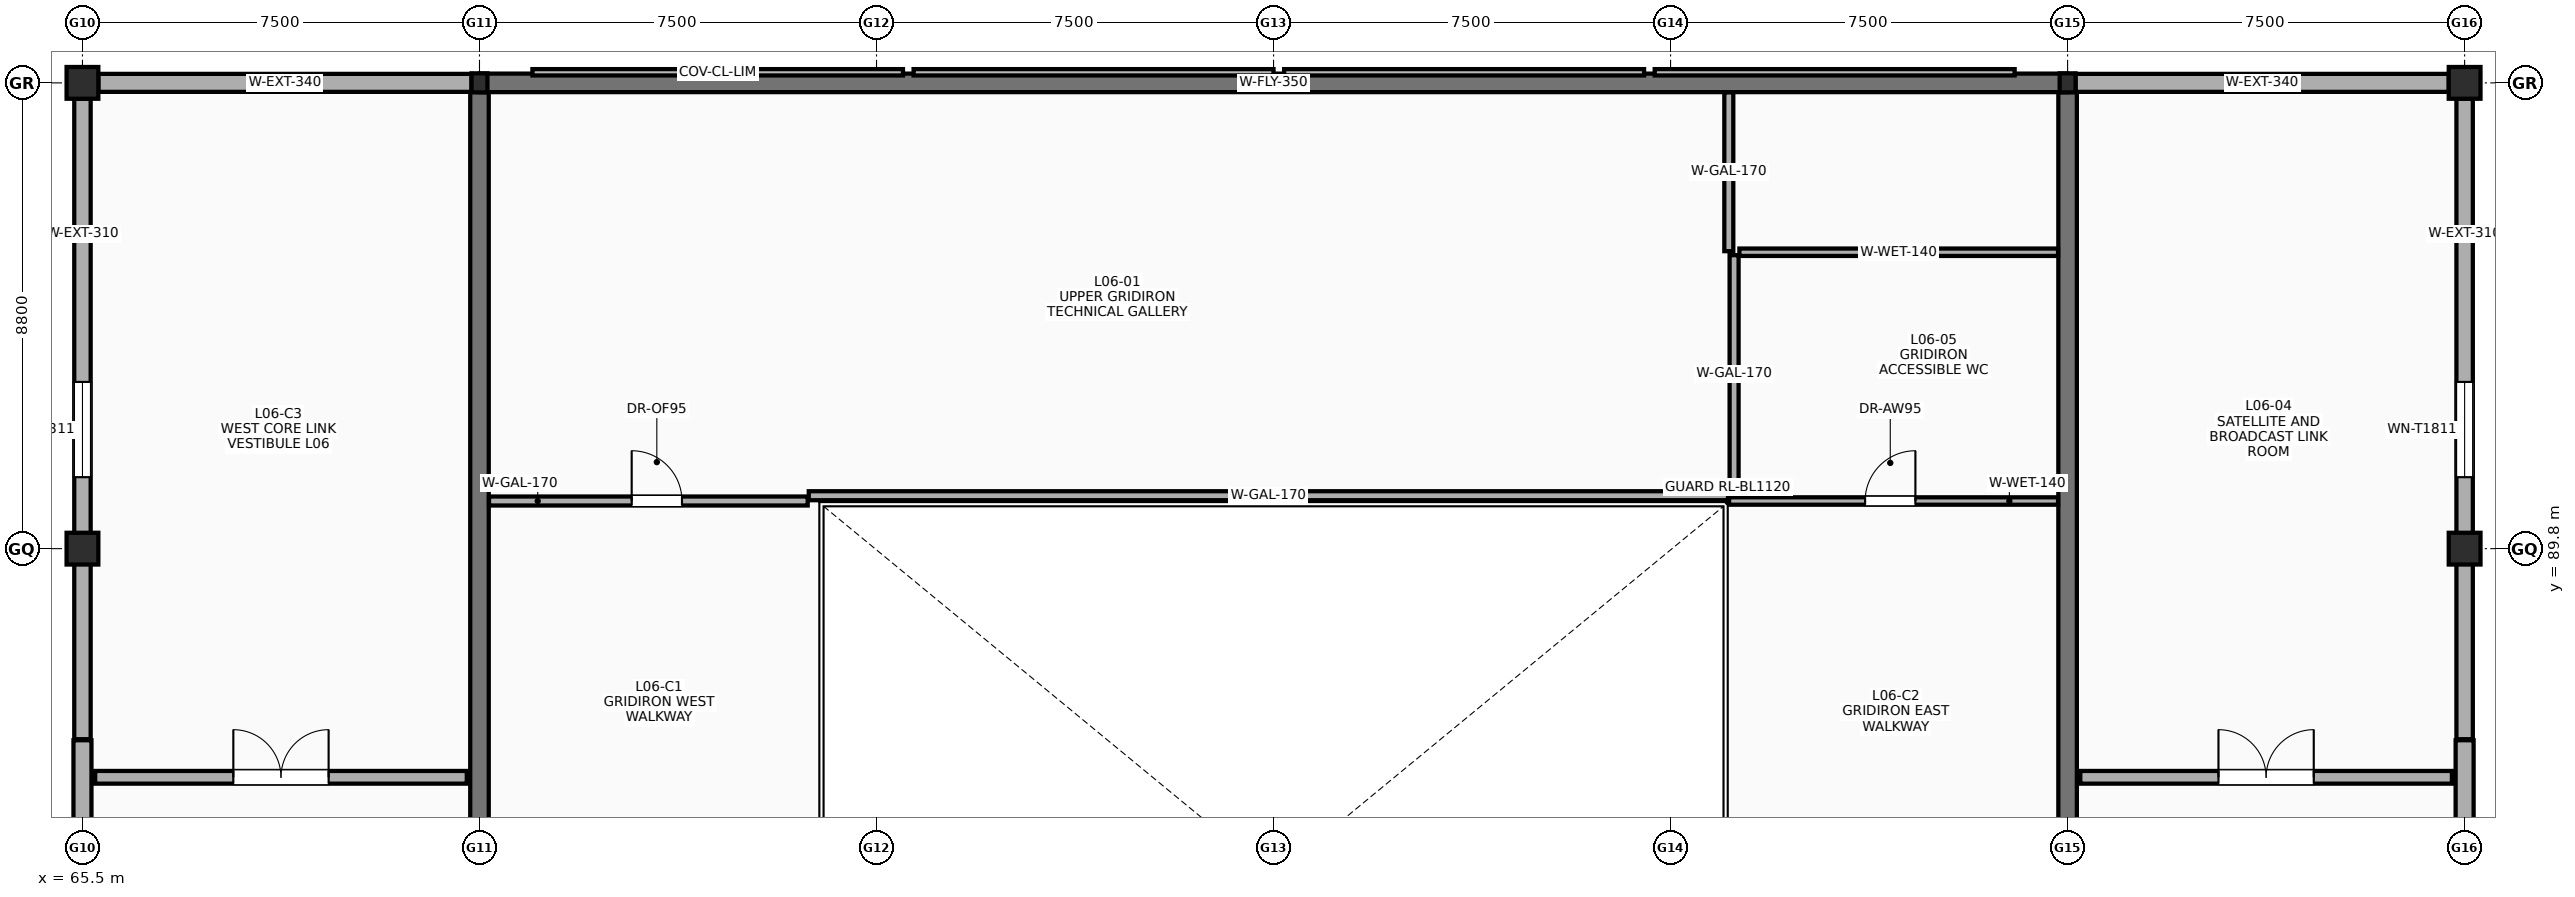
"""IFC4 building model, lengths in metres.
Left out: names, types, materials, properties, quantities, classifications, styles, units other than length and angle.
Written with IfcOpenShell. Run it as: python <this file> out.ifc"""

import sys

from ifc_helpers import new_model, si_unit, direction, frame, frame_2d, origin, origin_2d, place, context, subcontext, project, spatial, rectangle, i_section, extrude, element, fill, save


model = new_model("IFC4")
c1 = context("Model", 3, precision=1e-05, world=origin(), true_north=direction((0.0, 1.0)))
c2 = subcontext(c1, "Body", "Model", "MODEL_VIEW")
j1 = project(units=[si_unit("LENGTHUNIT", "METRE"), si_unit("PLANEANGLEUNIT", "RADIAN")], contexts=[c1])
p1 = place(None, origin())
s1 = spatial("IfcSite", under=j1, at=p1, CompositionType="ELEMENT")
p2 = place(p1, origin())
s2 = spatial("IfcBuilding", under=s1, at=p2, CompositionType="ELEMENT")
p3 = place(p2, frame((0.0, 0.0, 28.2)))
s3 = spatial("IfcBuildingStorey", under=s2, at=p3, CompositionType="ELEMENT", Elevation=28.2)
for number, where, z_axis, x_axis in (
    (1, (65.5, 89.8, 0.0), (0.0, 0.0, 1.0), (1.0, 0.0, 0.0)),
    (2, (65.5, 98.6, 0.0), (0.0, 0.0, 1.0), (1.0, 0.0, 0.0)),
):
    element("IfcColumn", number, at=place(p3, frame(where, z_axis=z_axis, x_axis=x_axis)), inside=s3, PredefinedType="COLUMN", context=c2, shape_type="SweptSolid", body=[
        extrude(rectangle(XDim=0.6, YDim=0.6, at=origin_2d()), origin(), (0.0, 0.0, 1.0), 2.8),
    ])
for number, where, z_axis, x_axis in (
    (3, (73.0, 98.6, 0.0), (0.0, 0.0, 1.0), (1.0, 0.0, 0.0)),
    (4, (103.0, 98.6, 0.0), (0.0, 0.0, 1.0), (1.0, 0.0, 0.0)),
):
    element("IfcColumn", number, at=place(p3, frame(where, z_axis=z_axis, x_axis=x_axis)), inside=s3, PredefinedType="COLUMN", context=c2, shape_type="SweptSolid", body=[
        extrude(i_section(OverallWidth=0.3, OverallDepth=0.36, WebThickness=0.012, FlangeThickness=0.022, FilletRadius=0.027, at=origin_2d()), origin(), (0.0, 0.0, 1.0), 2.8),
    ])
for number, where, z_axis, x_axis in (
    (5, (110.5, 89.8, 0.0), (0.0, 0.0, 1.0), (1.0, 0.0, 0.0)),
    (6, (110.5, 98.6, 0.0), (0.0, 0.0, 1.0), (1.0, 0.0, 0.0)),
):
    element("IfcColumn", number, at=place(p3, frame(where, z_axis=z_axis, x_axis=x_axis)), inside=s3, PredefinedType="COLUMN", context=c2, shape_type="SweptSolid", body=[
        extrude(rectangle(XDim=0.6, YDim=0.6, at=origin_2d()), origin(), (0.0, 0.0, 1.0), 2.8),
    ])
p4 = place(p3, frame((73.0, 72.77, 0.0), z_axis=(0.0, 0.0, 1.0), x_axis=(0.0, 1.0, 0.0)))
e7 = element("IfcWall", 7, at=p4, inside=s3, PredefinedType="SHEAR", context=c2, shape_type="SweptSolid", body=[
    extrude(rectangle(XDim=25.66, YDim=0.35, at=frame_2d((12.83, 0.0))), origin(), (0.0, 0.0, 1.0), 2.8),
])
p5 = place(p4, frame((11.33, 0.0, 0.0), z_axis=(0.0, 0.0, 1.0), x_axis=(-1.0, 0.0, 0.0)))
e8 = element("IfcOpeningElement", 8, at=p5, cuts=e7, PredefinedType="OPENING", context=c2, shape_type="SweptSolid", body=[
    extrude(rectangle(XDim=1.2, YDim=2.15, at=frame_2d((0.6, 1.075))), frame((0.0, 0.185, 0.0), z_axis=(0.0, -1.0, 0.0), x_axis=(1.0, 0.0, 0.0)), (0.0, 0.0, 1.0), 0.37),
])
p6 = place(p3, frame((103.0, 72.77, 0.0), z_axis=(0.0, 0.0, 1.0), x_axis=(0.0, 1.0, 0.0)))
e9 = element("IfcWall", 9, at=p6, inside=s3, PredefinedType="SHEAR", context=c2, shape_type="SweptSolid", body=[
    extrude(rectangle(XDim=25.66, YDim=0.35, at=frame_2d((12.83, 0.0))), origin(), (0.0, 0.0, 1.0), 2.8),
])
p7 = place(p6, frame((10.13, 0.0, 0.0)))
e10 = element("IfcOpeningElement", 10, at=p7, cuts=e9, PredefinedType="OPENING", context=c2, shape_type="SweptSolid", body=[
    extrude(rectangle(XDim=1.2, YDim=2.15, at=frame_2d((0.6, 1.075))), frame((0.0, 0.185, 0.0), z_axis=(0.0, -1.0, 0.0), x_axis=(1.0, 0.0, 0.0)), (0.0, 0.0, 1.0), 0.37),
])
p8 = place(p3, frame((73.005, 98.6, 0.0), z_axis=(0.0, 0.0, 1.0), x_axis=(1.0, 0.0, 0.0)))
e11 = element("IfcWall", 11, at=p8, inside=s3, PredefinedType="SHEAR", context=c2, shape_type="SweptSolid", body=[
    extrude(rectangle(XDim=29.99, YDim=0.35, at=frame_2d((14.995, 0.0))), origin(), (0.0, 0.0, 1.0), 2.8),
])
p9 = place(p3, frame((65.5, 86.2, 0.0), z_axis=(0.0, 0.0, 1.0), x_axis=(0.0, 1.0, 0.0)))
e12 = element("IfcWall", 12, at=p9, inside=s3, PredefinedType="SOLIDWALL", context=c2, shape_type="SweptSolid", body=[
    extrude(rectangle(XDim=12.1, YDim=0.31, at=frame_2d((6.05, 0.0))), origin(), (0.0, 0.0, 1.0), 1.76),
])
p10 = place(p9, frame((4.95, 0.0, 0.48)))
e13 = element("IfcOpeningElement", 13, at=p10, cuts=e12, PredefinedType="OPENING", context=c2, shape_type="SweptSolid", body=[
    extrude(rectangle(XDim=1.8, YDim=1.1, at=frame_2d((0.9, 0.55))), frame((0.0, 0.165, 0.0), z_axis=(0.0, -1.0, 0.0), x_axis=(1.0, 0.0, 0.0)), (0.0, 0.0, 1.0), 0.33),
])
p11 = place(p3, frame((110.5, 86.2, 0.0), z_axis=(0.0, 0.0, 1.0), x_axis=(0.0, 1.0, 0.0)))
e14 = element("IfcWall", 14, at=p11, inside=s3, PredefinedType="SOLIDWALL", context=c2, shape_type="SweptSolid", body=[
    extrude(rectangle(XDim=12.1, YDim=0.31, at=frame_2d((6.05, 0.0))), origin(), (0.0, 0.0, 1.0), 1.76),
])
p12 = place(p11, frame((4.95, 0.0, 0.48)))
e15 = element("IfcOpeningElement", 15, at=p12, cuts=e14, PredefinedType="OPENING", context=c2, shape_type="SweptSolid", body=[
    extrude(rectangle(XDim=1.8, YDim=1.1, at=frame_2d((0.9, 0.55))), frame((0.0, 0.165, 0.0), z_axis=(0.0, -1.0, 0.0), x_axis=(1.0, 0.0, 0.0)), (0.0, 0.0, 1.0), 0.33),
])
for number, where, z_axis, x_axis in (
    (16, (65.8, 98.6, 0.0), (0.0, 0.0, 1.0), (1.0, 0.0, 0.0)),
    (17, (103.15, 98.6, 0.0), (0.0, 0.0, 1.0), (1.0, 0.0, 0.0)),
):
    element("IfcWall", number, at=place(p3, frame(where, z_axis=z_axis, x_axis=x_axis)), inside=s3, PredefinedType="SOLIDWALL", context=c2, shape_type="SweptSolid", body=[
        extrude(rectangle(XDim=7.05, YDim=0.34, at=frame_2d((3.525, 0.0))), origin(), (0.0, 0.0, 1.0), 1.76),
    ])
p13 = place(p3, frame((65.74, 85.48, 0.0), z_axis=(0.0, 0.0, 1.0), x_axis=(1.0, 0.0, 0.0)))
e18 = element("IfcWall", 18, at=p13, inside=s3, PredefinedType="SOLIDWALL", context=c2, shape_type="SweptSolid", body=[
    extrude(rectangle(XDim=7.02, YDim=0.24, at=frame_2d((3.51, 0.0))), origin(), (0.0, 0.0, 1.0), 1.76),
])
p14 = place(p13, frame((2.61, 0.0, 0.0)))
e19 = element("IfcOpeningElement", 19, at=p14, cuts=e18, PredefinedType="OPENING", context=c2, shape_type="SweptSolid", body=[
    extrude(rectangle(XDim=1.8, YDim=2.18, at=frame_2d((0.9, 1.09))), frame((0.0, 0.13, 0.0), z_axis=(0.0, -1.0, 0.0), x_axis=(1.0, 0.0, 0.0)), (0.0, 0.0, 1.0), 0.26),
])
p15 = place(p3, frame((103.24, 85.48, 0.0), z_axis=(0.0, 0.0, 1.0), x_axis=(1.0, 0.0, 0.0)))
e20 = element("IfcWall", 20, at=p15, inside=s3, PredefinedType="SOLIDWALL", context=c2, shape_type="SweptSolid", body=[
    extrude(rectangle(XDim=7.02, YDim=0.24, at=frame_2d((3.51, 0.0))), origin(), (0.0, 0.0, 1.0), 1.76),
])
p16 = place(p15, frame((2.61, 0.0, 0.0)))
e21 = element("IfcOpeningElement", 21, at=p16, cuts=e20, PredefinedType="OPENING", context=c2, shape_type="SweptSolid", body=[
    extrude(rectangle(XDim=1.8, YDim=2.18, at=frame_2d((0.9, 1.09))), frame((0.0, 0.13, 0.0), z_axis=(0.0, -1.0, 0.0), x_axis=(1.0, 0.0, 0.0)), (0.0, 0.0, 1.0), 0.26),
])
p17 = place(p3, frame((96.7, 90.87, 0.0), z_axis=(0.0, 0.0, 1.0), x_axis=(0.0, 1.0, 0.0)))
e22 = element("IfcWall", 22, at=p17, inside=s3, PredefinedType="PARTITIONING", context=c2, shape_type="SweptSolid", body=[
    extrude(rectangle(XDim=4.475, YDim=0.17, at=frame_2d((2.237, 0.0))), origin(), (0.0, 0.0, 1.0), 2.5),
])
p18 = place(p3, frame((73.18, 90.7, 0.0), z_axis=(0.0, 0.0, 1.0), x_axis=(1.0, 0.0, 0.0)))
e23 = element("IfcWall", 23, at=p18, inside=s3, PredefinedType="PARTITIONING", context=c2, shape_type="SweptSolid", body=[
    extrude(rectangle(XDim=6.02, YDim=0.17, at=frame_2d((3.01, 0.0))), origin(), (0.0, 0.0, 1.0), 2.5),
])
p19 = place(p18, frame((2.695, 0.0, 0.0)))
e24 = element("IfcOpeningElement", 24, at=p19, cuts=e23, PredefinedType="OPENING", context=c2, shape_type="SweptSolid", body=[
    extrude(rectangle(XDim=0.95, YDim=2.15, at=frame_2d((0.475, 1.075))), frame((0.0, 0.095, 0.0), z_axis=(0.0, -1.0, 0.0), x_axis=(1.0, 0.0, 0.0)), (0.0, 0.0, 1.0), 0.19),
])
p20 = place(p3, frame((96.605, 90.7, 0.0), z_axis=(0.0, 0.0, 1.0), x_axis=(1.0, 0.0, 0.0)))
e25 = element("IfcWall", 25, at=p20, inside=s3, PredefinedType="PARTITIONING", context=c2, shape_type="SweptSolid", body=[
    extrude(rectangle(XDim=6.215, YDim=0.14, at=frame_2d((3.107, 0.0))), origin(), (0.0, 0.0, 1.0), 2.5),
])
p21 = place(p20, frame((2.57, 0.0, 0.0)))
e26 = element("IfcOpeningElement", 26, at=p21, cuts=e25, PredefinedType="OPENING", context=c2, shape_type="SweptSolid", body=[
    extrude(rectangle(XDim=0.95, YDim=2.1, at=frame_2d((0.475, 1.05))), frame((0.0, 0.08, 0.0), z_axis=(0.0, -1.0, 0.0), x_axis=(1.0, 0.0, 0.0)), (0.0, 0.0, 1.0), 0.16),
])
p22 = place(p3, frame((96.8, 95.4, 0.0), z_axis=(0.0, 0.0, 1.0), x_axis=(1.0, 0.0, 0.0)))
e27 = element("IfcWall", 27, at=p22, inside=s3, PredefinedType="PARTITIONING", context=c2, shape_type="SweptSolid", body=[
    extrude(rectangle(XDim=6.02, YDim=0.14, at=frame_2d((3.01, 0.0))), origin(), (0.0, 0.0, 1.0), 2.5),
])
for number, where, z_axis, x_axis in (
    (28, (110.5, 81.5, 0.0), (0.0, 0.0, 1.0), (0.0, 1.0, 0.0)),
    (29, (65.5, 81.5, 0.0), (0.0, 0.0, 1.0), (0.0, 1.0, 0.0)),
):
    element("IfcWall", number, at=place(p3, frame(where, z_axis=z_axis, x_axis=x_axis)), inside=s3, PredefinedType="SOLIDWALL", context=c2, shape_type="SweptSolid", body=[
        extrude(rectangle(XDim=4.68, YDim=0.34, at=frame_2d((2.34, 0.0))), origin(), (0.0, 0.0, 1.0), 1.76),
    ])
p23 = place(p3, frame((79.22, 90.8, 0.0), z_axis=(0.0, 0.0, 1.0), x_axis=(1.0, 0.0, 0.0)))
e30 = element("IfcWall", 30, at=p23, inside=s3, PredefinedType="PARTITIONING", context=c2, shape_type="SweptSolid", body=[
    extrude(rectangle(XDim=17.365, YDim=0.17, at=frame_2d((8.683, 0.0))), origin(), (0.0, 0.0, 1.0), 2.5),
])
p24 = place(p3, frame((96.6, 95.42, 0.0), z_axis=(0.0, 0.0, 1.0), x_axis=(0.0, 1.0, 0.0)))
e31 = element("IfcWall", 31, at=p24, inside=s3, PredefinedType="PARTITIONING", context=c2, shape_type="SweptSolid", body=[
    extrude(rectangle(XDim=3.0, YDim=0.17, at=frame_2d((1.5, 0.0))), origin(), (0.0, 0.0, 1.0), 2.5),
])
p25 = place(p10, origin())
e32 = element("IfcWindow", 32, at=p25, inside=s3, PartitioningType="SINGLE_PANEL", PredefinedType="WINDOW", context=c2, shape_type="SweptSolid", body=[
    extrude(rectangle(XDim=1.8, YDim=1.1, at=frame_2d((0.9, 0.55))), frame((0.0, 0.03, 0.0), z_axis=(0.0, -1.0, 0.0), x_axis=(1.0, 0.0, 0.0)), (0.0, 0.0, 1.0), 0.06),
])
fill(e13, e32)
p26 = place(p12, origin())
e33 = element("IfcWindow", 33, at=p26, inside=s3, PartitioningType="SINGLE_PANEL", PredefinedType="WINDOW", context=c2, shape_type="SweptSolid", body=[
    extrude(rectangle(XDim=1.8, YDim=1.1, at=frame_2d((0.9, 0.55))), frame((0.0, 0.03, 0.0), z_axis=(0.0, -1.0, 0.0), x_axis=(1.0, 0.0, 0.0)), (0.0, 0.0, 1.0), 0.06),
])
fill(e15, e33)
p27 = place(p14, origin())
e34 = element("IfcDoor", 34, at=p27, inside=s3, OperationType="DOUBLE_DOOR_SINGLE_SWING", PredefinedType="DOOR", context=c2, shape_type="SweptSolid", body=[
    extrude(rectangle(XDim=1.8, YDim=2.18, at=frame_2d((0.9, 1.09))), frame((0.0, 0.025, 0.0), z_axis=(0.0, -1.0, 0.0), x_axis=(1.0, 0.0, 0.0)), (0.0, 0.0, 1.0), 0.05),
])
fill(e19, e34)
p28 = place(p16, origin())
e35 = element("IfcDoor", 35, at=p28, inside=s3, OperationType="DOUBLE_DOOR_SINGLE_SWING", PredefinedType="DOOR", context=c2, shape_type="SweptSolid", body=[
    extrude(rectangle(XDim=1.8, YDim=2.18, at=frame_2d((0.9, 1.09))), frame((0.0, 0.025, 0.0), z_axis=(0.0, -1.0, 0.0), x_axis=(1.0, 0.0, 0.0)), (0.0, 0.0, 1.0), 0.05),
])
fill(e21, e35)
p29 = place(p19, origin())
e36 = element("IfcDoor", 36, at=p29, inside=s3, OperationType="SINGLE_SWING_LEFT", PredefinedType="DOOR", context=c2, shape_type="SweptSolid", body=[
    extrude(rectangle(XDim=0.95, YDim=2.15, at=frame_2d((0.475, 1.075))), frame((0.0, 0.025, 0.0), z_axis=(0.0, -1.0, 0.0), x_axis=(1.0, 0.0, 0.0)), (0.0, 0.0, 1.0), 0.05),
])
fill(e24, e36)
p30 = place(p21, origin())
e37 = element("IfcDoor", 37, at=p30, inside=s3, OperationType="SINGLE_SWING_RIGHT", PredefinedType="DOOR", context=c2, shape_type="SweptSolid", body=[
    extrude(rectangle(XDim=0.95, YDim=2.1, at=frame_2d((0.475, 1.05))), frame((0.0, 0.025, 0.0), z_axis=(0.0, -1.0, 0.0), x_axis=(1.0, 0.0, 0.0)), (0.0, 0.0, 1.0), 0.05),
])
fill(e26, e37)
save(model, sys.argv[1])
